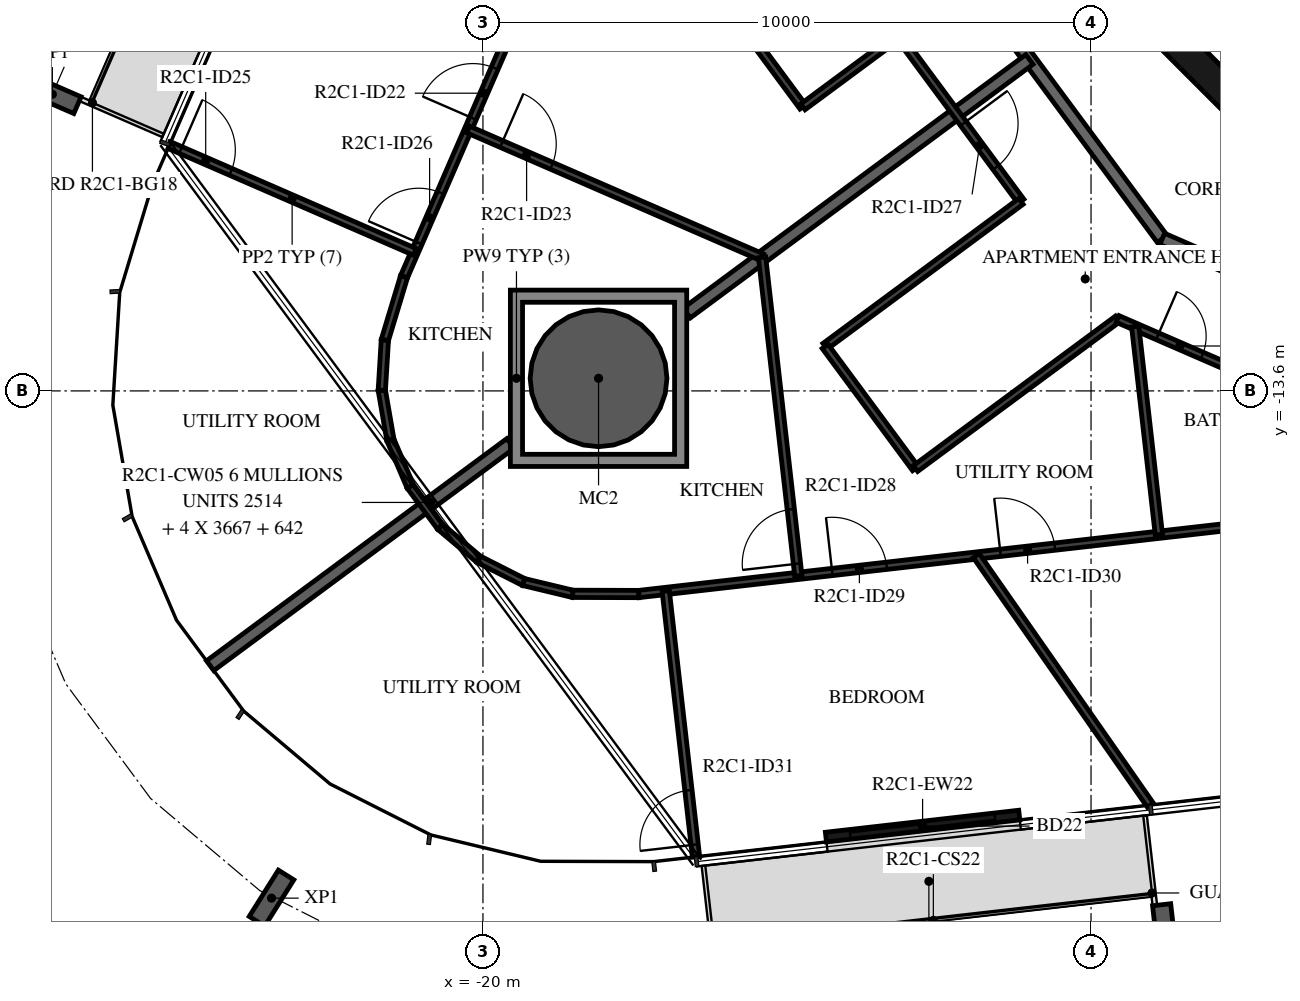
"""IFC4 building model, lengths in metres.
Left out: names, types, materials, properties, quantities, classifications, styles, units other than length and angle.
Written with IfcOpenShell. Run it as: python <this file> out.ifc"""

import sys

from ifc_helpers import new_model, si_unit, direction, frame, frame_2d, origin, origin_2d, place, context, subcontext, project, spatial, polyline, rectangle, hollow_circle, i_section, outline, extrude, element, fill, save


model = new_model("IFC4")
c1 = context("Model", 3, precision=1e-05, world=origin(), true_north=direction((0.0, 1.0)))
c2 = subcontext(c1, "Body", "Model", "MODEL_VIEW")
j1 = project(units=[si_unit("LENGTHUNIT", "METRE"), si_unit("PLANEANGLEUNIT", "RADIAN")], contexts=[c1])
p1 = place(None, origin())
s1 = spatial("IfcSite", under=j1, at=p1, CompositionType="ELEMENT")
p2 = place(p1, origin())
s2 = spatial("IfcBuilding", under=s1, at=p2, CompositionType="ELEMENT")
p3 = place(p2, frame((0.0, 0.0, 101.2)))
s3 = spatial("IfcBuildingStorey", under=s2, at=p3, CompositionType="ELEMENT", Elevation=101.2)
p4 = place(p3, frame((-18.099, -13.393, -0.38), z_axis=(0.0, 0.0, 1.0), x_axis=(1.0, 0.0, 0.0)))
e1 = element("IfcColumn", 1, at=p4, inside=s3, PredefinedType="COLUMN", context=c2, shape_type="SweptSolid", body=[
    extrude(hollow_circle(Radius=1.125, WallThickness=0.055, at=origin_2d()), origin(), (0.0, 0.0, 1.0), 3.5),
])
for number, where, z_axis, x_axis in (
    (2, (-27.081, -8.722, -0.38), (0.0, 0.0, 1.0), (0.399, 0.917, 0.0)),
    (3, (-23.477, -21.941, -0.38), (0.0, 0.0, 1.0), (-0.846, 0.532, 0.0)),
    (4, (-8.788, -22.497, -0.38), (0.0, 0.0, 1.0), (-0.994, -0.113, 0.0)),
):
    element("IfcColumn", number, at=place(p3, frame(where, z_axis=z_axis, x_axis=x_axis)), inside=s3, PredefinedType="COLUMN", context=c2, shape_type="SweptSolid", body=[
        extrude(i_section(OverallWidth=0.3, OverallDepth=0.9, WebThickness=0.019, FlangeThickness=0.035, FilletRadius=0.03, at=origin_2d()), origin(), (0.0, 0.0, 1.0), 3.5),
    ])
p5 = place(p3, frame((-14.36, -20.938, 0.0), z_axis=(0.0, 0.0, 1.0), x_axis=(0.993569019005, 0.11322810814, 0.0)))
e5 = element("IfcWall", 5, at=p5, inside=s3, PredefinedType="STANDARD", context=c2, shape_type="SweptSolid", body=[
    extrude(rectangle(XDim=3.2, YDim=0.16, at=frame_2d((1.6, 0.0))), origin(), (0.0, 0.0, 1.0), 3.12),
])
p6 = place(p5, frame((0.4, 0.0, 0.0)))
e6 = element("IfcOpeningElement", 6, at=p6, cuts=e5, PredefinedType="OPENING", context=c2, shape_type="SweptSolid", body=[
    extrude(rectangle(XDim=2.4, YDim=2.4, at=frame_2d((1.2, 1.2))), frame((0.0, 0.09, 0.0), z_axis=(0.0, -1.0, 0.0), x_axis=(1.0, 0.0, 0.0)), (0.0, 0.0, 1.0), 0.18),
])
p7 = place(p3, frame((-9.308, -7.164, 0.0), z_axis=(0.0, 0.0, 1.0), x_axis=(0.707106781187, -0.707106781187, 0.0)))
e7 = element("IfcWall", 7, at=p7, inside=s3, PredefinedType="SHEAR", context=c2, shape_type="SweptSolid", body=[
    extrude(rectangle(XDim=3.032, YDim=0.5, at=frame_2d((1.516, 0.0))), origin(), (0.0, 0.0, 1.0), 3.12),
])
p8 = place(p3, frame((-13.196, -5.198, 0.0), z_axis=(0.0, 0.0, 1.0), x_axis=(0.594805187394, -0.803869883159, 0.0)))
e8 = element("IfcWall", 8, at=p8, inside=s3, PredefinedType="STANDARD", context=c2, shape_type="SweptSolid", body=[
    extrude(rectangle(XDim=7.342, YDim=0.2, at=frame_2d((3.671, 0.0))), origin(), (0.0, 0.0, 1.0), 3.12),
])
p9 = place(p3, frame((-8.829, -11.1, 0.0), z_axis=(0.0, 0.0, 1.0), x_axis=(0.917063622491, -0.398740908742, 0.0)))
e9 = element("IfcWall", 9, at=p9, inside=s3, PredefinedType="STANDARD", context=c2, shape_type="SweptSolid", body=[
    extrude(rectangle(XDim=7.24, YDim=0.2, at=frame_2d((3.62, 0.0))), origin(), (0.0, 0.0, 1.0), 3.12),
])
p10 = place(p9, frame((6.04, 0.0, 0.0)))
e10 = element("IfcOpeningElement", 10, at=p10, cuts=e9, PredefinedType="OPENING", context=c2, shape_type="SweptSolid", body=[
    extrude(rectangle(XDim=1.0, YDim=2.1, at=frame_2d((0.5, 1.05))), frame((0.0, 0.11, 0.0), z_axis=(0.0, -1.0, 0.0), x_axis=(1.0, 0.0, 0.0)), (0.0, 0.0, 1.0), 0.22),
])
p11 = place(p3, frame((-16.649, -12.32, 0.0), z_axis=(0.0, 0.0, 1.0), x_axis=(0.803869204071, 0.594806105169, 0.0)))
e11 = element("IfcWall", 11, at=p11, inside=s3, PredefinedType="STANDARD", context=c2, shape_type="SweptSolid", body=[
    extrude(rectangle(XDim=7.011, YDim=0.2, at=frame_2d((3.506, 0.0))), origin(), (0.0, 0.0, 1.0), 3.12),
])
p12 = place(p3, frame((-24.486, -18.119, 0.0), z_axis=(0.0, 0.0, 1.0), x_axis=(0.80384227933, 0.594842491726, 0.0)))
e12 = element("IfcWall", 12, at=p12, inside=s3, PredefinedType="STANDARD", context=c2, shape_type="SweptSolid", body=[
    extrude(rectangle(XDim=6.142, YDim=0.2, at=frame_2d((3.071, 0.0))), origin(), (0.0, 0.0, 1.0), 3.12),
])
p13 = place(p3, frame((-15.75, -7.562, 0.0), z_axis=(0.0, 0.0, 1.0), x_axis=(0.594863421241, -0.803826791087, 0.0)))
e13 = element("IfcWall", 13, at=p13, inside=s3, PredefinedType="PARTITIONING", context=c2, shape_type="SweptSolid", body=[
    extrude(rectangle(XDim=1.7, YDim=0.12, at=frame_2d((0.85, 0.0))), origin(), (0.0, 0.0, 1.0), 3.12),
])
p14 = place(p3, frame((-14.739, -8.929, 0.0), z_axis=(0.0, 0.0, 1.0), x_axis=(0.803901491033, 0.594762467474, 0.0)))
e14 = element("IfcWall", 14, at=p14, inside=s3, PredefinedType="PARTITIONING", context=c2, shape_type="SweptSolid", body=[
    extrude(rectangle(XDim=1.959, YDim=0.12, at=frame_2d((0.979, 0.0))), origin(), (0.0, 0.0, 1.0), 3.12),
])
p15 = place(p3, frame((-13.164, -7.764, 0.0), z_axis=(0.0, 0.0, 1.0), x_axis=(0.594837409261, -0.803846040324, 0.0)))
e15 = element("IfcWall", 15, at=p15, inside=s3, PredefinedType="PARTITIONING", context=c2, shape_type="SweptSolid", body=[
    extrude(rectangle(XDim=3.383, YDim=0.12, at=frame_2d((1.691, 0.0))), origin(), (0.0, 0.0, 1.0), 3.12),
])
p16 = place(p15, frame((1.789, 0.0, 0.0)))
e16 = element("IfcOpeningElement", 16, at=p16, cuts=e15, PredefinedType="OPENING", context=c2, shape_type="SweptSolid", body=[
    extrude(rectangle(XDim=0.9, YDim=2.1, at=frame_2d((0.45, 1.05))), frame((0.0, 0.07, 0.0), z_axis=(0.0, -1.0, 0.0), x_axis=(1.0, 0.0, 0.0)), (0.0, 0.0, 1.0), 0.14),
])
p17 = place(p3, frame((-21.298, -11.722, 0.0), z_axis=(0.0, 0.0, 1.0), x_axis=(0.398738972546, 0.91706446435, 0.0)))
e17 = element("IfcWall", 17, at=p17, inside=s3, PredefinedType="PARTITIONING", context=c2, shape_type="SweptSolid", body=[
    extrude(rectangle(XDim=14.577, YDim=0.12, at=frame_2d((7.288, 0.0))), origin(), (0.0, 0.0, 1.0), 3.12),
])
p18 = place(p17, frame((2.841, 0.0, 0.0)))
e18 = element("IfcOpeningElement", 18, at=p18, cuts=e17, PredefinedType="OPENING", context=c2, shape_type="SweptSolid", body=[
    extrude(rectangle(XDim=0.9, YDim=2.1, at=frame_2d((0.45, 1.05))), frame((0.0, 0.07, 0.0), z_axis=(0.0, -1.0, 0.0), x_axis=(1.0, 0.0, 0.0)), (0.0, 0.0, 1.0), 0.14),
])
p19 = place(p17, frame((0.605, 0.0, 0.0)))
e19 = element("IfcOpeningElement", 19, at=p19, cuts=e17, PredefinedType="OPENING", context=c2, shape_type="SweptSolid", body=[
    extrude(rectangle(XDim=0.9, YDim=2.1, at=frame_2d((0.45, 1.05))), frame((0.0, 0.07, 0.0), z_axis=(0.0, -1.0, 0.0), x_axis=(1.0, 0.0, 0.0)), (0.0, 0.0, 1.0), 0.14),
])
p20 = place(p3, frame((-25.156, -9.559, 0.0), z_axis=(0.0, 0.0, 1.0), x_axis=(0.917042707292, -0.398789008127, 0.0)))
e20 = element("IfcWall", 20, at=p20, inside=s3, PredefinedType="PARTITIONING", context=c2, shape_type="SweptSolid", body=[
    extrude(rectangle(XDim=4.4, YDim=0.12, at=frame_2d((2.2, 0.0))), origin(), (0.0, 0.0, 1.0), 2.73),
])
p21 = place(p20, frame((0.2, 0.0, 0.0)))
e21 = element("IfcOpeningElement", 21, at=p21, cuts=e20, PredefinedType="OPENING", context=c2, shape_type="SweptSolid", body=[
    extrude(rectangle(XDim=0.9, YDim=2.1, at=frame_2d((0.45, 1.05))), frame((0.0, 0.07, 0.0), z_axis=(0.0, -1.0, 0.0), x_axis=(1.0, 0.0, 0.0)), (0.0, 0.0, 1.0), 0.14),
])
p22 = place(p3, frame((-20.245, -9.3, 0.0), z_axis=(0.0, 0.0, 1.0), x_axis=(0.91706784774, -0.398731190956, 0.0)))
e22 = element("IfcWall", 22, at=p22, inside=s3, PredefinedType="PARTITIONING", context=c2, shape_type="SweptSolid", body=[
    extrude(rectangle(XDim=5.272, YDim=0.12, at=frame_2d((2.636, 0.0))), origin(), (0.0, 0.0, 1.0), 3.12),
])
p23 = place(p22, frame((0.6, 0.0, 0.0)))
e23 = element("IfcOpeningElement", 23, at=p23, cuts=e22, PredefinedType="OPENING", context=c2, shape_type="SweptSolid", body=[
    extrude(rectangle(XDim=0.9, YDim=2.1, at=frame_2d((0.45, 1.05))), frame((0.0, 0.07, 0.0), z_axis=(0.0, -1.0, 0.0), x_axis=(1.0, 0.0, 0.0)), (0.0, 0.0, 1.0), 0.14),
])
for number, where, z_axis, x_axis in (
    (24, (-20.703, -15.835, 0.0), (0.0, 0.0, 1.0), (-0.595, 0.804, 0.0)),
    (25, (-21.196, -15.168, 0.0), (0.0, 0.0, 1.0), (-0.394, 0.919, 0.0)),
):
    element("IfcWall", number, at=place(p3, frame(where, z_axis=z_axis, x_axis=x_axis)), inside=s3, PredefinedType="PARTITIONING", context=c2, shape_type="SweptSolid", body=[
        extrude(rectangle(XDim=0.829, YDim=0.12, at=frame_2d((0.415, 0.0))), origin(), (0.0, 0.0, 1.0), 3.12),
    ])
p24 = place(p3, frame((-21.522, -14.406, 0.0), z_axis=(0.0, 0.0, 1.0), x_axis=(-0.170794347099, 0.985306698952, 0.0)))
e26 = element("IfcWall", 26, at=p24, inside=s3, PredefinedType="PARTITIONING", context=c2, shape_type="SweptSolid", body=[
    extrude(rectangle(XDim=0.829, YDim=0.12, at=frame_2d((0.415, 0.0))), origin(), (0.0, 0.0, 1.0), 3.12),
])
p25 = place(p3, frame((-21.664, -13.59, 0.0), z_axis=(0.0, 0.0, 1.0), x_axis=(0.061277779288, 0.998120751095, 0.0)))
e27 = element("IfcWall", 27, at=p25, inside=s3, PredefinedType="PARTITIONING", context=c2, shape_type="SweptSolid", body=[
    extrude(rectangle(XDim=0.829, YDim=0.12, at=frame_2d((0.414, 0.0))), origin(), (0.0, 0.0, 1.0), 3.12),
])
p26 = place(p3, frame((-21.613, -12.762, 0.0), z_axis=(0.0, 0.0, 1.0), x_axis=(0.289552239308, 0.95716221233, 0.0)))
e28 = element("IfcWall", 28, at=p26, inside=s3, PredefinedType="PARTITIONING", context=c2, shape_type="SweptSolid", body=[
    extrude(rectangle(XDim=1.087, YDim=0.12, at=frame_2d((0.543, 0.0))), origin(), (0.0, 0.0, 1.0), 3.12),
])
p27 = place(p3, frame((-11.152, -10.483, 0.0), z_axis=(0.0, 0.0, 1.0), x_axis=(-0.803843064298, -0.594841430954, 0.0)))
e29 = element("IfcWall", 29, at=p27, inside=s3, PredefinedType="PARTITIONING", context=c2, shape_type="SweptSolid", body=[
    extrude(rectangle(XDim=4.008, YDim=0.12, at=frame_2d((2.004, 0.0))), origin(), (0.0, 0.0, 1.0), 3.12),
])
p28 = place(p3, frame((-14.374, -12.867, 0.0), z_axis=(0.0, 0.0, 1.0), x_axis=(0.594800097121, -0.803873649565, 0.0)))
e30 = element("IfcWall", 30, at=p28, inside=s3, PredefinedType="PARTITIONING", context=c2, shape_type="SweptSolid", body=[
    extrude(rectangle(XDim=2.5, YDim=0.12, at=frame_2d((1.25, 0.0))), origin(), (0.0, 0.0, 1.0), 3.12),
])
p29 = place(p3, frame((-12.886, -14.877, 0.0), z_axis=(0.0, 0.0, 1.0), x_axis=(0.803816491389, 0.594877338761, 0.0)))
e31 = element("IfcWall", 31, at=p29, inside=s3, PredefinedType="PARTITIONING", context=c2, shape_type="SweptSolid", body=[
    extrude(rectangle(XDim=4.135, YDim=0.12, at=frame_2d((2.068, 0.0))), origin(), (0.0, 0.0, 1.0), 3.12),
])
p30 = place(p3, frame((-9.562, -12.417, 0.0), z_axis=(0.0, 0.0, 1.0), x_axis=(0.917063169851, -0.398741949767, 0.0)))
e32 = element("IfcWall", 32, at=p30, inside=s3, PredefinedType="PARTITIONING", context=c2, shape_type="SweptSolid", body=[
    extrude(rectangle(XDim=7.891, YDim=0.12, at=frame_2d((3.946, 0.0))), origin(), (0.0, 0.0, 1.0), 3.12),
])
p31 = place(p30, frame((0.715, 0.0, 0.0)))
e33 = element("IfcOpeningElement", 33, at=p31, cuts=e32, PredefinedType="OPENING", context=c2, shape_type="SweptSolid", body=[
    extrude(rectangle(XDim=0.8, YDim=2.1, at=frame_2d((0.4, 1.05))), frame((0.0, 0.07, 0.0), z_axis=(0.0, -1.0, 0.0), x_axis=(1.0, 0.0, 0.0)), (0.0, 0.0, 1.0), 0.14),
])
for number, where, z_axis, x_axis in (
    (34, (-20.703, -15.835, 0.0), (0.0, 0.0, 1.0), (0.764, -0.645, 0.0)),
    (35, (-20.069, -16.369, 0.0), (0.0, 0.0, 1.0), (0.892, -0.451, 0.0)),
):
    element("IfcWall", number, at=place(p3, frame(where, z_axis=z_axis, x_axis=x_axis)), inside=s3, PredefinedType="PARTITIONING", context=c2, shape_type="SweptSolid", body=[
        extrude(rectangle(XDim=0.829, YDim=0.12, at=frame_2d((0.415, 0.0))), origin(), (0.0, 0.0, 1.0), 3.12),
    ])
p32 = place(p3, frame((-19.33, -16.744, 0.0), z_axis=(0.0, 0.0, 1.0), x_axis=(0.972403343288, -0.23330610357, 0.0)))
e36 = element("IfcWall", 36, at=p32, inside=s3, PredefinedType="PARTITIONING", context=c2, shape_type="SweptSolid", body=[
    extrude(rectangle(XDim=0.829, YDim=0.12, at=frame_2d((0.415, 0.0))), origin(), (0.0, 0.0, 1.0), 3.12),
])
p33 = place(p3, frame((-18.524, -16.937, 0.0), z_axis=(0.0, 0.0, 1.0), x_axis=(0.999995736722, -0.00292002349, 0.0)))
e37 = element("IfcWall", 37, at=p33, inside=s3, PredefinedType="PARTITIONING", context=c2, shape_type="SweptSolid", body=[
    extrude(rectangle(XDim=1.087, YDim=0.12, at=frame_2d((0.543, 0.0))), origin(), (0.0, 0.0, 1.0), 3.12),
])
p34 = place(p3, frame((-17.437, -16.94, 0.0), z_axis=(0.0, 0.0, 1.0), x_axis=(0.993573314119, 0.113190412448, 0.0)))
e38 = element("IfcWall", 38, at=p34, inside=s3, PredefinedType="PARTITIONING", context=c2, shape_type="SweptSolid", body=[
    extrude(rectangle(XDim=14.576, YDim=0.12, at=frame_2d((7.288, 0.0))), origin(), (0.0, 0.0, 1.0), 3.12),
])
p35 = place(p34, frame((3.201, 0.0, 0.0)))
e39 = element("IfcOpeningElement", 39, at=p35, cuts=e38, PredefinedType="OPENING", context=c2, shape_type="SweptSolid", body=[
    extrude(rectangle(XDim=0.9, YDim=2.1, at=frame_2d((0.45, 1.05))), frame((0.0, 0.07, 0.0), z_axis=(0.0, -1.0, 0.0), x_axis=(1.0, 0.0, 0.0)), (0.0, 0.0, 1.0), 0.14),
])
p36 = place(p34, frame((5.985, 0.0, 0.0)))
e40 = element("IfcOpeningElement", 40, at=p36, cuts=e38, PredefinedType="OPENING", context=c2, shape_type="SweptSolid", body=[
    extrude(rectangle(XDim=0.9, YDim=2.1, at=frame_2d((0.45, 1.05))), frame((0.0, 0.07, 0.0), z_axis=(0.0, -1.0, 0.0), x_axis=(1.0, 0.0, 0.0)), (0.0, 0.0, 1.0), 0.14),
])
p37 = place(p3, frame((-14.813, -16.641, 0.0), z_axis=(0.0, 0.0, 1.0), x_axis=(-0.113210971478, 0.993570971767, 0.0)))
e41 = element("IfcWall", 41, at=p37, inside=s3, PredefinedType="PARTITIONING", context=c2, shape_type="SweptSolid", body=[
    extrude(rectangle(XDim=5.273, YDim=0.12, at=frame_2d((2.636, 0.0))), origin(), (0.0, 0.0, 1.0), 3.12),
])
p38 = place(p37, frame((0.2, 0.0, 0.0)))
e42 = element("IfcOpeningElement", 42, at=p38, cuts=e41, PredefinedType="OPENING", context=c2, shape_type="SweptSolid", body=[
    extrude(rectangle(XDim=0.9, YDim=2.1, at=frame_2d((0.45, 1.05))), frame((0.0, 0.07, 0.0), z_axis=(0.0, -1.0, 0.0), x_axis=(1.0, 0.0, 0.0)), (0.0, 0.0, 1.0), 0.14),
])
p39 = place(p3, frame((-16.496, -21.262, 0.0), z_axis=(0.0, 0.0, 1.0), x_axis=(-0.1132445713, 0.993567142709, 0.0)))
e43 = element("IfcWall", 43, at=p39, inside=s3, PredefinedType="PARTITIONING", context=c2, shape_type="SweptSolid", body=[
    extrude(rectangle(XDim=4.4, YDim=0.12, at=frame_2d((2.2, 0.0))), origin(), (0.0, 0.0, 1.0), 2.73),
])
p40 = place(p39, frame((0.2, 0.0, 0.0)))
e44 = element("IfcOpeningElement", 44, at=p40, cuts=e43, PredefinedType="OPENING", context=c2, shape_type="SweptSolid", body=[
    extrude(rectangle(XDim=0.9, YDim=2.1, at=frame_2d((0.45, 1.05))), frame((0.0, 0.07, 0.0), z_axis=(0.0, -1.0, 0.0), x_axis=(1.0, 0.0, 0.0)), (0.0, 0.0, 1.0), 0.14),
])
p41 = place(p3, frame((-8.884, -15.966, 0.0), z_axis=(0.0, 0.0, 1.0), x_axis=(-0.113230836929, 0.993568708026, 0.0)))
e45 = element("IfcWall", 45, at=p41, inside=s3, PredefinedType="PARTITIONING", context=c2, shape_type="SweptSolid", body=[
    extrude(rectangle(XDim=3.446, YDim=0.12, at=frame_2d((1.723, 0.0))), origin(), (0.0, 0.0, 1.0), 3.12),
])
p42 = place(p3, frame((-9.026, -20.41, 0.0), z_axis=(0.0, 0.0, 1.0), x_axis=(-0.57218083256, 0.82012748695, 0.0)))
e46 = element("IfcWall", 46, at=p42, inside=s3, PredefinedType="PARTITIONING", context=c2, shape_type="SweptSolid", body=[
    extrude(rectangle(XDim=5.002, YDim=0.12, at=frame_2d((2.501, 0.0))), origin(), (0.0, 0.0, 1.0), 3.12),
])
p43 = place(p3, origin())
e47 = element("IfcWall", 47, at=p43, inside=s3, PredefinedType="STANDARD", context=c2, shape_type="SweptSolid", body=[
    extrude(outline(polyline([(-16.649, -11.942), (-16.649, -14.843), (-19.549, -14.843), (-19.549, -11.942), (-16.649, -11.942)]), holes=[polyline([(-19.349, -14.643), (-16.849, -14.643), (-16.849, -12.143), (-19.349, -12.143), (-19.349, -14.643)])]), origin(), (0.0, 0.0, 1.0), 3.12),
])
p44 = place(p6, origin())
e48 = element("IfcDoor", 48, at=p44, inside=s3, OperationType="DOUBLE_DOOR_SLIDING", PredefinedType="DOOR", context=c2, shape_type="SweptSolid", body=[
    extrude(rectangle(XDim=2.4, YDim=2.4, at=frame_2d((1.2, 1.2))), frame((0.0, 0.025, 0.0), z_axis=(0.0, -1.0, 0.0), x_axis=(1.0, 0.0, 0.0)), (0.0, 0.0, 1.0), 0.05),
])
fill(e6, e48)
p45 = place(p18, origin())
e49 = element("IfcDoor", 49, at=p45, inside=s3, OperationType="SINGLE_SWING_RIGHT", PredefinedType="DOOR", context=c2, shape_type="SweptSolid", body=[
    extrude(rectangle(XDim=0.9, YDim=2.1, at=frame_2d((0.45, 1.05))), frame((0.0, 0.025, 0.0), z_axis=(0.0, -1.0, 0.0), x_axis=(1.0, 0.0, 0.0)), (0.0, 0.0, 1.0), 0.05),
])
fill(e18, e49)
p46 = place(p23, origin())
e50 = element("IfcDoor", 50, at=p46, inside=s3, OperationType="SINGLE_SWING_RIGHT", PredefinedType="DOOR", context=c2, shape_type="SweptSolid", body=[
    extrude(rectangle(XDim=0.9, YDim=2.1, at=frame_2d((0.45, 1.05))), frame((0.0, 0.025, 0.0), z_axis=(0.0, -1.0, 0.0), x_axis=(1.0, 0.0, 0.0)), (0.0, 0.0, 1.0), 0.05),
])
fill(e23, e50)
p47 = place(p21, origin())
e51 = element("IfcDoor", 51, at=p47, inside=s3, OperationType="SINGLE_SWING_RIGHT", PredefinedType="DOOR", context=c2, shape_type="SweptSolid", body=[
    extrude(rectangle(XDim=0.9, YDim=2.1, at=frame_2d((0.45, 1.05))), frame((0.0, 0.025, 0.0), z_axis=(0.0, -1.0, 0.0), x_axis=(1.0, 0.0, 0.0)), (0.0, 0.0, 1.0), 0.05),
])
fill(e21, e51)
p48 = place(p19, origin())
e52 = element("IfcDoor", 52, at=p48, inside=s3, OperationType="SINGLE_SWING_LEFT", PredefinedType="DOOR", context=c2, shape_type="SweptSolid", body=[
    extrude(rectangle(XDim=0.9, YDim=2.1, at=frame_2d((0.45, 1.05))), frame((0.0, 0.025, 0.0), z_axis=(0.0, -1.0, 0.0), x_axis=(1.0, 0.0, 0.0)), (0.0, 0.0, 1.0), 0.05),
])
fill(e19, e52)
p49 = place(p16, origin())
e53 = element("IfcDoor", 53, at=p49, inside=s3, OperationType="SINGLE_SWING_LEFT", PredefinedType="DOOR", context=c2, shape_type="SweptSolid", body=[
    extrude(rectangle(XDim=0.9, YDim=2.1, at=frame_2d((0.45, 1.05))), frame((0.0, 0.025, 0.0), z_axis=(0.0, -1.0, 0.0), x_axis=(1.0, 0.0, 0.0)), (0.0, 0.0, 1.0), 0.05),
])
fill(e16, e53)
p50 = place(p31, origin())
e54 = element("IfcDoor", 54, at=p50, inside=s3, OperationType="SINGLE_SWING_LEFT", PredefinedType="DOOR", context=c2, shape_type="SweptSolid", body=[
    extrude(rectangle(XDim=0.8, YDim=2.1, at=frame_2d((0.4, 1.05))), frame((0.0, 0.025, 0.0), z_axis=(0.0, -1.0, 0.0), x_axis=(1.0, 0.0, 0.0)), (0.0, 0.0, 1.0), 0.05),
])
fill(e33, e54)
p51 = place(p38, origin())
e55 = element("IfcDoor", 55, at=p51, inside=s3, OperationType="SINGLE_SWING_LEFT", PredefinedType="DOOR", context=c2, shape_type="SweptSolid", body=[
    extrude(rectangle(XDim=0.9, YDim=2.1, at=frame_2d((0.45, 1.05))), frame((0.0, 0.025, 0.0), z_axis=(0.0, -1.0, 0.0), x_axis=(1.0, 0.0, 0.0)), (0.0, 0.0, 1.0), 0.05),
])
fill(e42, e55)
p52 = place(p35, origin())
e56 = element("IfcDoor", 56, at=p52, inside=s3, OperationType="SINGLE_SWING_LEFT", PredefinedType="DOOR", context=c2, shape_type="SweptSolid", body=[
    extrude(rectangle(XDim=0.9, YDim=2.1, at=frame_2d((0.45, 1.05))), frame((0.0, 0.025, 0.0), z_axis=(0.0, -1.0, 0.0), x_axis=(1.0, 0.0, 0.0)), (0.0, 0.0, 1.0), 0.05),
])
fill(e39, e56)
p53 = place(p36, origin())
e57 = element("IfcDoor", 57, at=p53, inside=s3, OperationType="SINGLE_SWING_LEFT", PredefinedType="DOOR", context=c2, shape_type="SweptSolid", body=[
    extrude(rectangle(XDim=0.9, YDim=2.1, at=frame_2d((0.45, 1.05))), frame((0.0, 0.025, 0.0), z_axis=(0.0, -1.0, 0.0), x_axis=(1.0, 0.0, 0.0)), (0.0, 0.0, 1.0), 0.05),
])
fill(e40, e57)
p54 = place(p40, origin())
e58 = element("IfcDoor", 58, at=p54, inside=s3, OperationType="SINGLE_SWING_LEFT", PredefinedType="DOOR", context=c2, shape_type="SweptSolid", body=[
    extrude(rectangle(XDim=0.9, YDim=2.1, at=frame_2d((0.45, 1.05))), frame((0.0, 0.025, 0.0), z_axis=(0.0, -1.0, 0.0), x_axis=(1.0, 0.0, 0.0)), (0.0, 0.0, 1.0), 0.05),
])
fill(e44, e58)
save(model, sys.argv[1])
